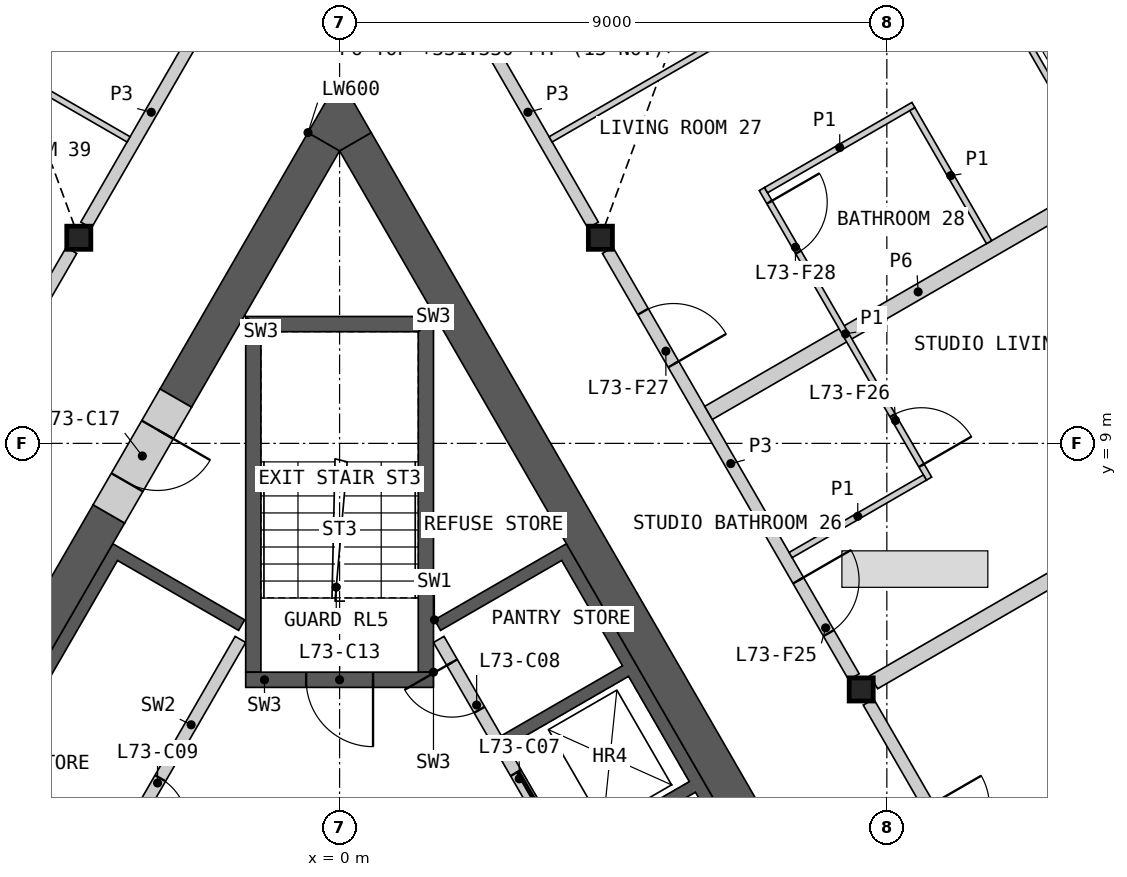
"""IFC4 building model, lengths in metres.
Left out: names, types, materials, properties, quantities, classifications, styles, units other than length and angle.
Written with IfcOpenShell. Run it as: python <this file> out.ifc"""

import sys

from ifc_helpers import new_model, si_unit, direction, frame, frame_2d, origin, origin_2d, place, context, subcontext, project, spatial, polyline, rectangle, i_section, outline, extrude, element, fill, save


model = new_model("IFC4")
c1 = context("Model", 3, precision=1e-05, world=origin(), true_north=direction((0.0, 1.0)))
c2 = subcontext(c1, "Body", "Model", "MODEL_VIEW")
j1 = project(units=[si_unit("LENGTHUNIT", "METRE"), si_unit("PLANEANGLEUNIT", "RADIAN")], contexts=[c1])
p1 = place(None, origin())
s1 = spatial("IfcSite", under=j1, at=p1, CompositionType="ELEMENT")
p2 = place(p1, origin())
s2 = spatial("IfcBuilding", under=s1, at=p2, CompositionType="ELEMENT")
p3 = place(p2, frame((0.0, 0.0, 329.0)))
s3 = spatial("IfcBuildingStorey", under=s2, at=p3, CompositionType="ELEMENT", Elevation=329.0)
for number, where, z_axis, x_axis in (
    (1, (-4.289, 12.382, 0.0), (0.0, 0.0, 1.0), (1.0, 0.0, 0.0)),
    (2, (8.578, 4.953, 0.0), (0.0, 0.0, 1.0), (1.0, 0.0, 0.0)),
    (3, (4.289, 12.382, 0.0), (0.0, 0.0, 1.0), (1.0, 0.0, 0.0)),
):
    element("IfcColumn", number, at=place(p3, frame(where, z_axis=z_axis, x_axis=x_axis)), inside=s3, PredefinedType="COLUMN", context=c2, shape_type="SweptSolid", body=[
        extrude(i_section(OverallWidth=0.396, OverallDepth=0.381, WebThickness=0.019, FlangeThickness=0.03, at=origin_2d()), origin(), (0.0, 0.0, 1.0), 3.4),
    ])
p4 = place(p3, origin())
e4 = element("IfcWall", 4, at=p4, inside=s3, PredefinedType="SHEAR", context=c2, shape_type="SweptSolid", body=[
    extrude(outline(polyline([(1.561, 6.097), (3.731, 7.35), (8.231, -0.444), (6.061, -1.697), (5.96, -1.524), (7.952, -0.374), (6.952, 1.358), (4.96, 0.208), (4.861, 0.381), (6.852, 1.531), (5.852, 3.263), (3.861, 2.113), (3.76, 2.287), (5.752, 3.437), (4.752, 5.169), (2.76, 4.019), (2.66, 4.192), (4.652, 5.342), (3.652, 7.074), (1.66, 5.924), (1.561, 6.097)])), origin(), (0.0, 0.0, 1.0), 3.1),
])
p5 = place(p3, frame((5.817, -1.476, 0.0), z_axis=(0.0, 0.0, 1.0), x_axis=(-0.500002616675, 0.866023893041, 0.0)))
e5 = element("IfcWall", 5, at=p5, inside=s3, PredefinedType="SOLIDWALL", context=c2, shape_type="SweptSolid", body=[
    extrude(rectangle(XDim=8.373, YDim=0.2, at=frame_2d((4.187, 0.0))), origin(), (0.0, 0.0, 1.0), 3.1),
])
p6 = place(p5, frame((0.337, 0.0, 0.0)))
e6 = element("IfcOpeningElement", 6, at=p6, cuts=e5, PredefinedType="OPENING", context=c2, shape_type="SweptSolid", body=[
    extrude(rectangle(XDim=1.1, YDim=2.1, at=frame_2d((0.55, 1.05))), frame((0.0, 0.11, 0.0), z_axis=(0.0, -1.0, 0.0), x_axis=(1.0, 0.0, 0.0)), (0.0, 0.0, 1.0), 0.22),
])
p7 = place(p5, frame((2.537, 0.0, 0.0)))
e7 = element("IfcOpeningElement", 7, at=p7, cuts=e5, PredefinedType="OPENING", context=c2, shape_type="SweptSolid", body=[
    extrude(rectangle(XDim=1.1, YDim=2.1, at=frame_2d((0.55, 1.05))), frame((0.0, 0.11, 0.0), z_axis=(0.0, -1.0, 0.0), x_axis=(1.0, 0.0, 0.0)), (0.0, 0.0, 1.0), 0.22),
])
p8 = place(p5, frame((4.737, 0.0, 0.0)))
e8 = element("IfcOpeningElement", 8, at=p8, cuts=e5, PredefinedType="OPENING", context=c2, shape_type="SweptSolid", body=[
    extrude(rectangle(XDim=1.1, YDim=2.1, at=frame_2d((0.55, 1.05))), frame((0.0, 0.11, 0.0), z_axis=(0.0, -1.0, 0.0), x_axis=(1.0, 0.0, 0.0)), (0.0, 0.0, 1.0), 0.22),
])
p9 = place(p5, frame((7.037, 0.0, 0.0)))
e9 = element("IfcOpeningElement", 9, at=p9, cuts=e5, PredefinedType="OPENING", context=c2, shape_type="SweptSolid", body=[
    extrude(rectangle(XDim=0.9, YDim=2.1, at=frame_2d((0.45, 1.05))), frame((0.0, 0.11, 0.0), z_axis=(0.0, -1.0, 0.0), x_axis=(1.0, 0.0, 0.0)), (0.0, 0.0, 1.0), 0.22),
])
p10 = place(p3, origin())
e10 = element("IfcWall", 10, at=p10, inside=s3, PredefinedType="SHEAR", context=c2, shape_type="SweptSolid", body=[
    extrude(outline(polyline([(-4.96, 0.208), (-7.131, 1.461), (-3.731, 7.35), (-1.561, 6.097), (-1.66, 5.924), (-3.652, 7.074), (-6.852, 1.531), (-4.861, 0.381), (-4.96, 0.208)])), origin(), (0.0, 0.0, 1.0), 3.1),
])
p11 = place(p3, frame((-1.631, 5.776, 0.0), z_axis=(0.0, 0.0, 1.0), x_axis=(-0.499992876559, -0.866029516466, 0.0)))
e11 = element("IfcWall", 11, at=p11, inside=s3, PredefinedType="SOLIDWALL", context=c2, shape_type="SweptSolid", body=[
    extrude(rectangle(XDim=6.486, YDim=0.2, at=frame_2d((3.243, 0.0))), origin(), (0.0, 0.0, 1.0), 3.1),
])
p12 = place(p11, frame((2.637, 0.0, 0.0)))
e12 = element("IfcOpeningElement", 12, at=p12, cuts=e11, PredefinedType="OPENING", context=c2, shape_type="SweptSolid", body=[
    extrude(rectangle(XDim=0.9, YDim=2.1, at=frame_2d((0.45, 1.05))), frame((0.0, 0.11, 0.0), z_axis=(0.0, -1.0, 0.0), x_axis=(1.0, 0.0, 0.0)), (0.0, 0.0, 1.0), 0.22),
])
p13 = place(p3, origin())
e13 = element("IfcWall", 13, at=p13, inside=s3, PredefinedType="SHEAR", context=c2, shape_type="SweptSolid", body=[
    extrude(outline(polyline([(1.544, 5.237), (1.544, 11.087), (1.294, 10.837), (1.294, 5.237), (1.544, 5.237)])), origin(), (0.0, 0.0, 1.0), 3.1),
])
p14 = place(p3, origin())
e14 = element("IfcWall", 14, at=p14, inside=s3, PredefinedType="SHEAR", context=c2, shape_type="SweptSolid", body=[
    extrude(outline(polyline([(1.544, 11.087), (-1.544, 11.087), (-1.294, 10.837), (1.294, 10.837), (1.544, 11.087)])), origin(), (0.0, 0.0, 1.0), 3.1),
])
p15 = place(p3, origin())
e15 = element("IfcWall", 15, at=p15, inside=s3, PredefinedType="SHEAR", context=c2, shape_type="SweptSolid", body=[
    extrude(outline(polyline([(-1.294, 10.837), (-1.544, 11.087), (-1.544, 5.237), (-1.294, 5.237), (-1.294, 10.837)])), origin(), (0.0, 0.0, 1.0), 3.1),
])
p16 = place(p3, frame((1.544, 5.112, 0.0), z_axis=(0.0, 0.0, 1.0), x_axis=(-1.0, 0.0, 0.0)))
e16 = element("IfcWall", 16, at=p16, inside=s3, PredefinedType="SHEAR", context=c2, shape_type="SweptSolid", body=[
    extrude(rectangle(XDim=3.088, YDim=0.25, at=frame_2d((1.544, 0.0))), origin(), (0.0, 0.0, 1.0), 3.1),
])
p17 = place(p16, frame((0.994, 0.0, 0.0)))
e17 = element("IfcOpeningElement", 17, at=p17, cuts=e16, PredefinedType="OPENING", context=c2, shape_type="SweptSolid", body=[
    extrude(rectangle(XDim=1.1, YDim=2.1, at=frame_2d((0.55, 1.05))), frame((0.0, 0.135, 0.0), z_axis=(0.0, -1.0, 0.0), x_axis=(1.0, 0.0, 0.0)), (0.0, 0.0, 1.0), 0.27),
])
p18 = place(p3, frame((8.686, -0.634, 0.0), z_axis=(0.0, 0.0, 1.0), x_axis=(-0.500004601921, 0.866022746848, 0.0)))
e18 = element("IfcWall", 18, at=p18, inside=s3, PredefinedType="SHEAR", context=c2, shape_type="SweptSolid", body=[
    extrude(rectangle(XDim=16.853, YDim=0.6, at=frame_2d((8.426, 0.0))), origin(), (0.0, 0.0, 1.0), 3.1),
])
p19 = place(p3, frame((-3.794, 7.84, 0.0), z_axis=(0.0, 0.0, 1.0), x_axis=(-0.499974747889, -0.866039982607, 0.0)))
e19 = element("IfcWall", 19, at=p19, inside=s3, PredefinedType="SHEAR", context=c2, shape_type="SweptSolid", body=[
    extrude(rectangle(XDim=7.092, YDim=0.6, at=frame_2d((3.546, 0.0))), origin(), (0.0, 0.0, 1.0), 3.1),
])
p20 = place(p3, frame((-0.26, 13.961, 0.0), z_axis=(0.0, 0.0, 1.0), x_axis=(-0.50000604952, -0.866021911064, 0.0)))
e20 = element("IfcWall", 20, at=p20, inside=s3, PredefinedType="SHEAR", context=c2, shape_type="SweptSolid", body=[
    extrude(rectangle(XDim=4.869, YDim=0.6, at=frame_2d((2.434, 0.0))), origin(), (0.0, 0.0, 1.0), 3.1),
])
p21 = place(p3, origin())
e21 = element("IfcWall", 21, at=p21, inside=s3, PredefinedType="SHEAR", context=c2, shape_type="SweptSolid", body=[
    extrude(outline(polyline([(-0.52, 14.111), (0.0, 15.011), (0.52, 14.111), (0.0, 13.811), (-0.52, 14.111)])), origin(), (0.0, 0.0, 1.0), 3.1),
])
p22 = place(p3, frame((-2.694, 9.745, 0.0), z_axis=(0.0, 0.0, 1.0), x_axis=(-0.50002983664, -0.866008176907, 0.0)))
e22 = element("IfcWall", 22, at=p22, inside=s3, PredefinedType="SHEAR", context=c2, shape_type="SweptSolid", body=[
    extrude(rectangle(XDim=2.2, YDim=0.6, at=frame_2d((1.1, 0.0))), origin(), (0.0, 0.0, 1.0), 3.1),
])
p23 = place(p22, frame((0.6, 0.0, 0.0)))
e23 = element("IfcOpeningElement", 23, at=p23, cuts=e22, PredefinedType="OPENING", context=c2, shape_type="SweptSolid", body=[
    extrude(rectangle(XDim=1.0, YDim=2.1, at=frame_2d((0.5, 1.05))), frame((0.0, 0.31, 0.0), z_axis=(0.0, -1.0, 0.0), x_axis=(1.0, 0.0, 0.0)), (0.0, 0.0, 1.0), 0.62),
])
p24 = place(p3, frame((8.786, 5.073, 0.0), z_axis=(0.0, 0.0, 1.0), x_axis=(0.86602139559, 0.500006942333, 0.0)))
e24 = element("IfcWall", 24, at=p24, inside=s3, PredefinedType="PARTITIONING", context=c2, shape_type="SweptSolid", body=[
    extrude(rectangle(XDim=12.505, YDim=0.25, at=frame_2d((6.252, 0.0))), origin(), (0.0, 0.0, 1.0), 2.33),
])
p25 = place(p3, frame((4.409, 12.174, 0.0), z_axis=(0.0, 0.0, 1.0), x_axis=(0.499984266882, -0.866034487114, 0.0)))
e25 = element("IfcWall", 25, at=p25, inside=s3, PredefinedType="PARTITIONING", context=c2, shape_type="SweptSolid", body=[
    extrude(rectangle(XDim=8.099, YDim=0.2, at=frame_2d((4.049, 0.0))), origin(), (0.0, 0.0, 1.0), 3.1),
])
p26 = place(p25, frame((6.269, 0.0, 0.0)))
e26 = element("IfcOpeningElement", 26, at=p26, cuts=e25, PredefinedType="OPENING", context=c2, shape_type="SweptSolid", body=[
    extrude(rectangle(XDim=1.0, YDim=2.1, at=frame_2d((0.5, 1.05))), frame((0.0, 0.11, 0.0), z_axis=(0.0, -1.0, 0.0), x_axis=(1.0, 0.0, 0.0)), (0.0, 0.0, 1.0), 0.22),
])
p27 = place(p25, frame((1.164, 0.0, 0.0)))
e27 = element("IfcOpeningElement", 27, at=p27, cuts=e25, PredefinedType="OPENING", context=c2, shape_type="SweptSolid", body=[
    extrude(rectangle(XDim=1.0, YDim=2.1, at=frame_2d((0.5, 1.05))), frame((0.0, 0.11, 0.0), z_axis=(0.0, -1.0, 0.0), x_axis=(1.0, 0.0, 0.0)), (0.0, 0.0, 1.0), 0.22),
])
p28 = place(p3, frame((-8.458, 5.16, 0.0), z_axis=(0.0, 0.0, 1.0), x_axis=(0.499984266882, 0.866034487114, 0.0)))
e28 = element("IfcWall", 28, at=p28, inside=s3, PredefinedType="PARTITIONING", context=c2, shape_type="SweptSolid", body=[
    extrude(rectangle(XDim=8.099, YDim=0.2, at=frame_2d((4.049, 0.0))), origin(), (0.0, 0.0, 1.0), 3.1),
])
p29 = place(p28, frame((5.935, 0.0, 0.0)))
e29 = element("IfcOpeningElement", 29, at=p29, cuts=e28, PredefinedType="OPENING", context=c2, shape_type="SweptSolid", body=[
    extrude(rectangle(XDim=1.0, YDim=2.1, at=frame_2d((0.5, 1.05))), frame((0.0, 0.11, 0.0), z_axis=(0.0, -1.0, 0.0), x_axis=(1.0, 0.0, 0.0)), (0.0, 0.0, 1.0), 0.22),
])
p30 = place(p28, frame((0.83, 0.0, 0.0)))
e30 = element("IfcOpeningElement", 30, at=p30, cuts=e28, PredefinedType="OPENING", context=c2, shape_type="SweptSolid", body=[
    extrude(rectangle(XDim=1.0, YDim=2.1, at=frame_2d((0.5, 1.05))), frame((0.0, 0.11, 0.0), z_axis=(0.0, -1.0, 0.0), x_axis=(1.0, 0.0, 0.0)), (0.0, 0.0, 1.0), 0.22),
])
p31 = place(p3, frame((8.698, 4.745, 0.0), z_axis=(0.0, 0.0, 1.0), x_axis=(0.499984266882, -0.866034487114, 0.0)))
e31 = element("IfcWall", 31, at=p31, inside=s3, PredefinedType="PARTITIONING", context=c2, shape_type="SweptSolid", body=[
    extrude(rectangle(XDim=8.099, YDim=0.2, at=frame_2d((4.049, 0.0))), origin(), (0.0, 0.0, 1.0), 3.1),
])
p32 = place(p31, frame((1.976, 0.0, 0.0)))
e32 = element("IfcOpeningElement", 32, at=p32, cuts=e31, PredefinedType="OPENING", context=c2, shape_type="SweptSolid", body=[
    extrude(rectangle(XDim=1.0, YDim=2.1, at=frame_2d((0.5, 1.05))), frame((0.0, 0.11, 0.0), z_axis=(0.0, -1.0, 0.0), x_axis=(1.0, 0.0, 0.0)), (0.0, 0.0, 1.0), 0.22),
])
p33 = place(p3, frame((6.068, 9.501, 0.0), z_axis=(0.0, 0.0, 1.0), x_axis=(0.866022671543, 0.50000473235, 0.0)))
e33 = element("IfcWall", 33, at=p33, inside=s3, PredefinedType="PARTITIONING", context=c2, shape_type="SweptSolid", body=[
    extrude(rectangle(XDim=7.961, YDim=0.25, at=frame_2d((3.98, 0.0))), origin(), (0.0, 0.0, 1.0), 2.33),
])
for number, where, z_axis, x_axis in (
    (34, (2.025, 16.303, 0.0), (0.0, 0.0, 1.0), (0.5, -0.866, 0.0)),
    (35, (-4.169, 12.59, 0.0), (0.0, 0.0, 1.0), (0.5, 0.866, 0.0)),
):
    element("IfcWall", number, at=place(p3, frame(where, z_axis=z_axis, x_axis=x_axis)), inside=s3, PredefinedType="PARTITIONING", context=c2, shape_type="SweptSolid", body=[
        extrude(rectangle(XDim=4.288, YDim=0.2, at=frame_2d((2.144, 0.0))), origin(), (0.0, 0.0, 1.0), 3.1),
    ])
p34 = place(p3, frame((-14.417, 20.32, 0.0), z_axis=(0.0, 0.0, 1.0), x_axis=(0.866021216079, -0.500007253249, 0.0)))
e36 = element("IfcWall", 36, at=p34, inside=s3, PredefinedType="PARTITIONING", context=c2, shape_type="SweptSolid", body=[
    extrude(rectangle(XDim=12.639, YDim=0.1, at=frame_2d((6.32, 0.0))), origin(), (0.0, 0.0, 1.0), 2.33),
])
p35 = place(p34, frame((3.375, 0.0, 0.0)))
e37 = element("IfcOpeningElement", 37, at=p35, cuts=e36, PredefinedType="OPENING", context=c2, shape_type="SweptSolid", body=[
    extrude(rectangle(XDim=0.95, YDim=2.1, at=frame_2d((0.475, 1.05))), frame((0.0, 0.06, 0.0), z_axis=(0.0, -1.0, 0.0), x_axis=(1.0, 0.0, 0.0)), (0.0, 0.0, 1.0), 0.12),
])
p36 = place(p3, frame((3.47, 14.0, 0.0), z_axis=(0.0, 0.0, 1.0), x_axis=(0.866021216079, 0.500007253249, 0.0)))
e38 = element("IfcWall", 38, at=p36, inside=s3, PredefinedType="PARTITIONING", context=c2, shape_type="SweptSolid", body=[
    extrude(rectangle(XDim=12.639, YDim=0.1, at=frame_2d((6.32, 0.0))), origin(), (0.0, 0.0, 1.0), 2.33),
])
p37 = place(p36, frame((8.314, 0.0, 0.0)))
e39 = element("IfcOpeningElement", 39, at=p37, cuts=e38, PredefinedType="OPENING", context=c2, shape_type="SweptSolid", body=[
    extrude(rectangle(XDim=0.95, YDim=2.1, at=frame_2d((0.475, 1.05))), frame((0.0, 0.06, 0.0), z_axis=(0.0, -1.0, 0.0), x_axis=(1.0, 0.0, 0.0)), (0.0, 0.0, 1.0), 0.12),
])
p38 = place(p3, frame((11.262, 0.504, 0.0), z_axis=(0.0, 0.0, 1.0), x_axis=(0.866020217342, 0.500008983073, 0.0)))
e40 = element("IfcWall", 40, at=p38, inside=s3, PredefinedType="PARTITIONING", context=c2, shape_type="SweptSolid", body=[
    extrude(rectangle(XDim=7.966, YDim=0.1, at=frame_2d((3.983, 0.0))), origin(), (0.0, 0.0, 1.0), 2.33),
])
p39 = place(p38, frame((5.362, 0.0, 0.0)))
e41 = element("IfcOpeningElement", 41, at=p39, cuts=e40, PredefinedType="OPENING", context=c2, shape_type="SweptSolid", body=[
    extrude(rectangle(XDim=0.95, YDim=2.1, at=frame_2d((0.475, 1.05))), frame((0.0, 0.06, 0.0), z_axis=(0.0, -1.0, 0.0), x_axis=(1.0, 0.0, 0.0)), (0.0, 0.0, 1.0), 0.12),
])
p40 = place(p3, frame((6.944, 13.183, 0.0), z_axis=(0.0, 0.0, 1.0), x_axis=(0.499996545922, -0.866027397988, 0.0)))
e42 = element("IfcWall", 42, at=p40, inside=s3, PredefinedType="PARTITIONING", context=c2, shape_type="SweptSolid", body=[
    extrude(rectangle(XDim=5.5, YDim=0.1, at=frame_2d((2.75, 0.0))), origin(), (0.0, 0.0, 1.0), 2.33),
])
p41 = place(p40, frame((4.3, 0.0, 0.0)))
e43 = element("IfcOpeningElement", 43, at=p41, cuts=e42, PredefinedType="OPENING", context=c2, shape_type="SweptSolid", body=[
    extrude(rectangle(XDim=0.95, YDim=2.1, at=frame_2d((0.475, 1.05))), frame((0.0, 0.06, 0.0), z_axis=(0.0, -1.0, 0.0), x_axis=(1.0, 0.0, 0.0)), (0.0, 0.0, 1.0), 0.12),
])
p42 = place(p40, frame((0.25, 0.0, 0.0)))
e44 = element("IfcOpeningElement", 44, at=p42, cuts=e42, PredefinedType="OPENING", context=c2, shape_type="SweptSolid", body=[
    extrude(rectangle(XDim=0.95, YDim=2.1, at=frame_2d((0.475, 1.05))), frame((0.0, 0.06, 0.0), z_axis=(0.0, -1.0, 0.0), x_axis=(1.0, 0.0, 0.0)), (0.0, 0.0, 1.0), 0.12),
])
p43 = place(p3, frame((10.065, 17.75, 0.0), z_axis=(0.0, 0.0, 1.0), x_axis=(0.499989096993, -0.866031698547, 0.0)))
e45 = element("IfcWall", 45, at=p43, inside=s3, PredefinedType="PARTITIONING", context=c2, shape_type="SweptSolid", body=[
    extrude(rectangle(XDim=5.02, YDim=0.1, at=frame_2d((2.51, 0.0))), origin(), (0.0, 0.0, 1.0), 2.33),
])
p44 = place(p43, frame((0.862, 0.0, 0.0)))
e46 = element("IfcOpeningElement", 46, at=p44, cuts=e45, PredefinedType="OPENING", context=c2, shape_type="SweptSolid", body=[
    extrude(rectangle(XDim=0.95, YDim=2.1, at=frame_2d((0.475, 1.05))), frame((0.0, 0.06, 0.0), z_axis=(0.0, -1.0, 0.0), x_axis=(1.0, 0.0, 0.0)), (0.0, 0.0, 1.0), 0.12),
])
p45 = place(p3, frame((7.013, 13.165, 0.0), z_axis=(0.0, 0.0, 1.0), x_axis=(0.866034573852, 0.49998411664, 0.0)))
e47 = element("IfcWall", 47, at=p45, inside=s3, PredefinedType="PARTITIONING", context=c2, shape_type="SweptSolid", body=[
    extrude(rectangle(XDim=2.8, YDim=0.1, at=frame_2d((1.4, 0.0))), origin(), (0.0, 0.0, 1.0), 2.33),
])
p46 = place(p3, frame((7.418, 7.163, 0.0), z_axis=(0.0, 0.0, 1.0), x_axis=(0.866054858364, 0.499948979701, 0.0)))
e48 = element("IfcWall", 48, at=p46, inside=s3, PredefinedType="PARTITIONING", context=c2, shape_type="SweptSolid", body=[
    extrude(rectangle(XDim=2.55, YDim=0.1, at=frame_2d((1.275, 0.0))), origin(), (0.0, 0.0, 1.0), 2.33),
])
p47 = place(p3, frame((9.419, 14.497, 0.0), z_axis=(0.0, 0.0, 1.0), x_axis=(0.499976333282, -0.866039067339, 0.0)))
e49 = element("IfcWall", 49, at=p47, inside=s3, PredefinedType="PARTITIONING", context=c2, shape_type="SweptSolid", body=[
    extrude(rectangle(XDim=2.525, YDim=0.1, at=frame_2d((1.262, 0.0))), origin(), (0.0, 0.0, 1.0), 2.33),
])
p48 = place(p8, origin())
e50 = element("IfcDoor", 50, at=p48, inside=s3, OperationType="SLIDING_TO_LEFT", PredefinedType="DOOR", context=c2, shape_type="SweptSolid", body=[
    extrude(rectangle(XDim=1.1, YDim=2.1, at=frame_2d((0.55, 1.05))), frame((0.0, 0.025, 0.0), z_axis=(0.0, -1.0, 0.0), x_axis=(1.0, 0.0, 0.0)), (0.0, 0.0, 1.0), 0.05),
])
fill(e8, e50)
p49 = place(p9, origin())
e51 = element("IfcDoor", 51, at=p49, inside=s3, OperationType="SINGLE_SWING_RIGHT", PredefinedType="DOOR", context=c2, shape_type="SweptSolid", body=[
    extrude(rectangle(XDim=0.9, YDim=2.1, at=frame_2d((0.45, 1.05))), frame((0.0, 0.025, 0.0), z_axis=(0.0, -1.0, 0.0), x_axis=(1.0, 0.0, 0.0)), (0.0, 0.0, 1.0), 0.05),
])
fill(e9, e51)
p50 = place(p12, origin())
e52 = element("IfcDoor", 52, at=p50, inside=s3, OperationType="SINGLE_SWING_RIGHT", PredefinedType="DOOR", context=c2, shape_type="SweptSolid", body=[
    extrude(rectangle(XDim=0.9, YDim=2.1, at=frame_2d((0.45, 1.05))), frame((0.0, 0.025, 0.0), z_axis=(0.0, -1.0, 0.0), x_axis=(1.0, 0.0, 0.0)), (0.0, 0.0, 1.0), 0.05),
])
fill(e12, e52)
p51 = place(p17, origin())
e53 = element("IfcDoor", 53, at=p51, inside=s3, OperationType="SINGLE_SWING_LEFT", PredefinedType="DOOR", context=c2, shape_type="SweptSolid", body=[
    extrude(rectangle(XDim=1.1, YDim=2.1, at=frame_2d((0.55, 1.05))), frame((0.0, 0.025, 0.0), z_axis=(0.0, -1.0, 0.0), x_axis=(1.0, 0.0, 0.0)), (0.0, 0.0, 1.0), 0.05),
])
fill(e17, e53)
p52 = place(p23, origin())
e54 = element("IfcDoor", 54, at=p52, inside=s3, OperationType="SINGLE_SWING_LEFT", PredefinedType="DOOR", context=c2, shape_type="SweptSolid", body=[
    extrude(rectangle(XDim=1.0, YDim=2.1, at=frame_2d((0.5, 1.05))), frame((0.0, 0.055, 0.0), z_axis=(0.0, -1.0, 0.0), x_axis=(1.0, 0.0, 0.0)), (0.0, 0.0, 1.0), 0.05),
])
fill(e23, e54)
p53 = place(p26, origin())
e55 = element("IfcDoor", 55, at=p53, inside=s3, OperationType="SINGLE_SWING_LEFT", PredefinedType="DOOR", context=c2, shape_type="SweptSolid", body=[
    extrude(rectangle(XDim=1.0, YDim=2.1, at=frame_2d((0.5, 1.05))), frame((0.0, 0.025, 0.0), z_axis=(0.0, -1.0, 0.0), x_axis=(1.0, 0.0, 0.0)), (0.0, 0.0, 1.0), 0.05),
])
fill(e26, e55)
p54 = place(p41, origin())
e56 = element("IfcDoor", 56, at=p54, inside=s3, OperationType="SINGLE_SWING_RIGHT", PredefinedType="DOOR", context=c2, shape_type="SweptSolid", body=[
    extrude(rectangle(XDim=0.95, YDim=2.1, at=frame_2d((0.475, 1.05))), frame((0.0, 0.025, 0.0), z_axis=(0.0, -1.0, 0.0), x_axis=(1.0, 0.0, 0.0)), (0.0, 0.0, 1.0), 0.05),
])
fill(e43, e56)
p55 = place(p27, origin())
e57 = element("IfcDoor", 57, at=p55, inside=s3, OperationType="SINGLE_SWING_RIGHT", PredefinedType="DOOR", context=c2, shape_type="SweptSolid", body=[
    extrude(rectangle(XDim=1.0, YDim=2.1, at=frame_2d((0.5, 1.05))), frame((0.0, 0.025, 0.0), z_axis=(0.0, -1.0, 0.0), x_axis=(1.0, 0.0, 0.0)), (0.0, 0.0, 1.0), 0.05),
])
fill(e27, e57)
p56 = place(p42, origin())
e58 = element("IfcDoor", 58, at=p56, inside=s3, OperationType="SINGLE_SWING_LEFT", PredefinedType="DOOR", context=c2, shape_type="SweptSolid", body=[
    extrude(rectangle(XDim=0.95, YDim=2.1, at=frame_2d((0.475, 1.05))), frame((0.0, 0.025, 0.0), z_axis=(0.0, -1.0, 0.0), x_axis=(1.0, 0.0, 0.0)), (0.0, 0.0, 1.0), 0.05),
])
fill(e44, e58)
save(model, sys.argv[1])
